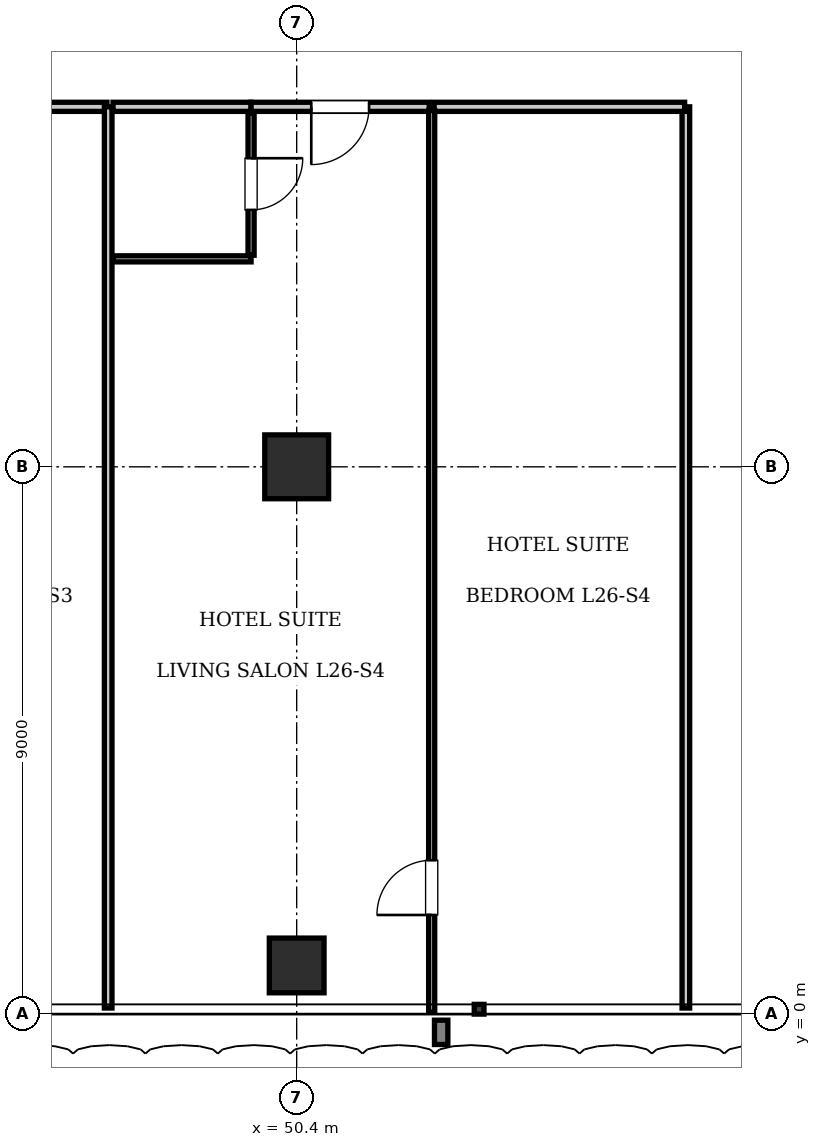
"""IFC4 building model, lengths in metres.
Left out: names, types, materials, properties, quantities, classifications, styles, units other than length and angle.
Written with IfcOpenShell. Run it as: python <this file> out.ifc"""

import sys

from ifc_helpers import new_model, si_unit, direction, frame, frame_2d, origin, origin_2d, place, context, subcontext, project, spatial, rectangle, extrude, element, fill, save


model = new_model("IFC4")
c1 = context("Model", 3, precision=1e-05, world=origin(), true_north=direction((0.0, 1.0)))
c2 = subcontext(c1, "Body", "Model", "MODEL_VIEW")
j1 = project(units=[si_unit("LENGTHUNIT", "METRE"), si_unit("PLANEANGLEUNIT", "RADIAN")], contexts=[c1])
p1 = place(None, origin())
s1 = spatial("IfcSite", under=j1, at=p1, CompositionType="ELEMENT")
p2 = place(p1, origin())
s2 = spatial("IfcBuilding", under=s1, at=p2, CompositionType="ELEMENT")
p3 = place(p2, frame((0.0, 0.0, 107.8)))
s3 = spatial("IfcBuildingStorey", under=s2, at=p3, CompositionType="ELEMENT", Elevation=107.8)
p4 = place(p3, frame((50.4, 9.0, 0.0), z_axis=(0.0, 0.0, 1.0), x_axis=(1.0, 0.0, 0.0)))
e1 = element("IfcColumn", 1, at=p4, inside=s3, PredefinedType="COLUMN", context=c2, shape_type="SweptSolid", body=[
    extrude(rectangle(XDim=1.05, YDim=1.05, at=origin_2d()), origin(), (0.0, 0.0, 1.0), 3.85),
])
p5 = place(p3, frame((50.4, 0.8, 0.0), z_axis=(0.0, 0.0, 1.0), x_axis=(1.0, 0.0, 0.0)))
e2 = element("IfcColumn", 2, at=p5, inside=s3, PredefinedType="COLUMN", context=c2, shape_type="SweptSolid", body=[
    extrude(rectangle(XDim=0.9, YDim=0.9, at=origin_2d()), origin(), (0.0, 0.0, 1.0), 3.85),
])
p6 = place(p3, frame((56.8, 0.1, 0.0), z_axis=(0.0, 0.0, 1.0), x_axis=(0.0, 1.0, 0.0)))
e3 = element("IfcWall", 3, at=p6, inside=s3, PredefinedType="PARTITIONING", context=c2, shape_type="SweptSolid", body=[
    extrude(rectangle(XDim=14.82, YDim=0.125, at=frame_2d((7.41, 0.0))), origin(), (0.0, 0.0, 1.0), 3.61),
])
p7 = place(p3, frame((43.16, 14.92, 0.0), z_axis=(0.0, 0.0, 1.0), x_axis=(1.0, 0.0, 0.0)))
e4 = element("IfcWall", 4, at=p7, inside=s3, PredefinedType="PARTITIONING", context=c2, shape_type="SweptSolid", body=[
    extrude(rectangle(XDim=4.12, YDim=0.15, at=frame_2d((2.06, 0.0))), origin(), (0.0, 0.0, 1.0), 3.61),
])
p8 = place(p3, frame((47.3, 0.1, 0.0), z_axis=(0.0, 0.0, 1.0), x_axis=(0.0, 1.0, 0.0)))
e5 = element("IfcWall", 5, at=p8, inside=s3, PredefinedType="PARTITIONING", context=c2, shape_type="SweptSolid", body=[
    extrude(rectangle(XDim=14.82, YDim=0.125, at=frame_2d((7.41, 0.0))), origin(), (0.0, 0.0, 1.0), 3.61),
])
p9 = place(p3, frame((47.38, 14.92, 0.0), z_axis=(0.0, 0.0, 1.0), x_axis=(1.0, 0.0, 0.0)))
e6 = element("IfcWall", 6, at=p9, inside=s3, PredefinedType="PARTITIONING", context=c2, shape_type="SweptSolid", body=[
    extrude(rectangle(XDim=2.27, YDim=0.15, at=frame_2d((1.135, 0.0))), origin(), (0.0, 0.0, 1.0), 3.61),
])
p10 = place(p3, frame((47.38, 12.42, 0.0), z_axis=(0.0, 0.0, 1.0), x_axis=(1.0, 0.0, 0.0)))
e7 = element("IfcWall", 7, at=p10, inside=s3, PredefinedType="PARTITIONING", context=c2, shape_type="SweptSolid", body=[
    extrude(rectangle(XDim=2.27, YDim=0.1, at=frame_2d((1.135, 0.0))), origin(), (0.0, 0.0, 1.0), 3.61),
])
p11 = place(p3, frame((49.65, 12.48, 0.0), z_axis=(0.0, 0.0, 1.0), x_axis=(0.0, 1.0, 0.0)))
e8 = element("IfcWall", 8, at=p11, inside=s3, PredefinedType="PARTITIONING", context=c2, shape_type="SweptSolid", body=[
    extrude(rectangle(XDim=2.34, YDim=0.1, at=frame_2d((1.17, 0.0))), origin(), (0.0, 0.0, 1.0), 3.61),
])
p12 = place(p11, frame((0.745, 0.0, 0.0)))
e9 = element("IfcOpeningElement", 9, at=p12, cuts=e8, PredefinedType="OPENING", context=c2, shape_type="SweptSolid", body=[
    extrude(rectangle(XDim=0.85, YDim=2.1, at=frame_2d((0.425, 1.05))), frame((0.0, 0.06, 0.0), z_axis=(0.0, -1.0, 0.0), x_axis=(1.0, 0.0, 0.0)), (0.0, 0.0, 1.0), 0.12),
])
p13 = place(p3, frame((49.65, 14.92, 0.0), z_axis=(0.0, 0.0, 1.0), x_axis=(1.0, 0.0, 0.0)))
e10 = element("IfcWall", 10, at=p13, inside=s3, PredefinedType="PARTITIONING", context=c2, shape_type="SweptSolid", body=[
    extrude(rectangle(XDim=2.93, YDim=0.15, at=frame_2d((1.465, 0.0))), origin(), (0.0, 0.0, 1.0), 3.61),
])
p14 = place(p13, frame((0.99, 0.0, 0.0)))
e11 = element("IfcOpeningElement", 11, at=p14, cuts=e10, PredefinedType="OPENING", context=c2, shape_type="SweptSolid", body=[
    extrude(rectangle(XDim=0.95, YDim=2.15, at=frame_2d((0.475, 1.075))), frame((0.0, 0.085, 0.0), z_axis=(0.0, -1.0, 0.0), x_axis=(1.0, 0.0, 0.0)), (0.0, 0.0, 1.0), 0.17),
])
p15 = place(p3, frame((52.66, 14.92, 0.0), z_axis=(0.0, 0.0, 1.0), x_axis=(1.0, 0.0, 0.0)))
e12 = element("IfcWall", 12, at=p15, inside=s3, PredefinedType="PARTITIONING", context=c2, shape_type="SweptSolid", body=[
    extrude(rectangle(XDim=4.12, YDim=0.15, at=frame_2d((2.06, 0.0))), origin(), (0.0, 0.0, 1.0), 3.61),
])
p16 = place(p3, frame((52.62, 0.03, 0.0), z_axis=(0.0, 0.0, 1.0), x_axis=(0.0, 1.0, 0.0)))
e13 = element("IfcWall", 13, at=p16, inside=s3, PredefinedType="PARTITIONING", context=c2, shape_type="SweptSolid", body=[
    extrude(rectangle(XDim=14.83, YDim=0.1, at=frame_2d((7.415, 0.0))), origin(), (0.0, 0.0, 1.0), 3.61),
])
p17 = place(p16, frame((1.6, 0.0, 0.0)))
e14 = element("IfcOpeningElement", 14, at=p17, cuts=e13, PredefinedType="OPENING", context=c2, shape_type="SweptSolid", body=[
    extrude(rectangle(XDim=0.9, YDim=2.1, at=frame_2d((0.45, 1.05))), frame((0.0, 0.06, 0.0), z_axis=(0.0, -1.0, 0.0), x_axis=(1.0, 0.0, 0.0)), (0.0, 0.0, 1.0), 0.12),
])
p18 = place(p12, frame((0.85, 0.0, 0.0), z_axis=(0.0, 0.0, 1.0), x_axis=(-1.0, 0.0, 0.0)))
e15 = element("IfcDoor", 15, at=p18, inside=s3, OperationType="SINGLE_SWING_LEFT", PredefinedType="DOOR", context=c2, shape_type="SweptSolid", body=[
    extrude(rectangle(XDim=0.85, YDim=2.1, at=frame_2d((0.425, 1.05))), frame((0.0, 0.025, 0.0), z_axis=(0.0, -1.0, 0.0), x_axis=(1.0, 0.0, 0.0)), (0.0, 0.0, 1.0), 0.05),
])
fill(e9, e15)
p19 = place(p14, frame((0.95, 0.0, 0.0), z_axis=(0.0, 0.0, 1.0), x_axis=(-1.0, 0.0, 0.0)))
e16 = element("IfcDoor", 16, at=p19, inside=s3, OperationType="SINGLE_SWING_RIGHT", PredefinedType="DOOR", context=c2, shape_type="SweptSolid", body=[
    extrude(rectangle(XDim=0.95, YDim=2.15, at=frame_2d((0.475, 1.075))), frame((0.0, 0.025, 0.0), z_axis=(0.0, -1.0, 0.0), x_axis=(1.0, 0.0, 0.0)), (0.0, 0.0, 1.0), 0.05),
])
fill(e11, e16)
p20 = place(p17, origin())
e17 = element("IfcDoor", 17, at=p20, inside=s3, OperationType="SINGLE_SWING_LEFT", PredefinedType="DOOR", context=c2, shape_type="SweptSolid", body=[
    extrude(rectangle(XDim=0.9, YDim=2.1, at=frame_2d((0.45, 1.05))), frame((0.0, 0.025, 0.0), z_axis=(0.0, -1.0, 0.0), x_axis=(1.0, 0.0, 0.0)), (0.0, 0.0, 1.0), 0.05),
])
fill(e14, e17)
save(model, sys.argv[1])
